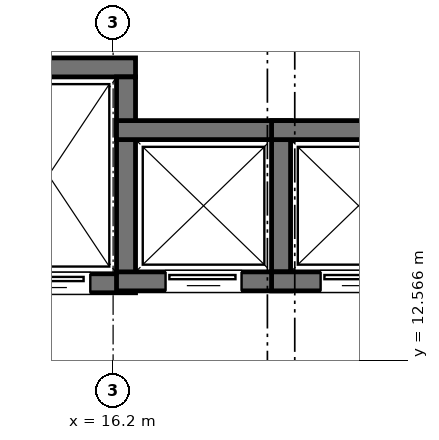
"""IFC4 building model, lengths in metres.
Left out: names, types, materials, properties, quantities, classifications, styles, units other than length and angle.
Written with IfcOpenShell. Run it as: python <this file> out.ifc"""

import sys

from ifc_helpers import new_model, si_unit, direction, frame, frame_2d, origin, place, context, subcontext, project, spatial, rectangle, extrude, element, fill, save


model = new_model("IFC4")
c1 = context("Model", 3, precision=1e-05, world=origin(), true_north=direction((0.0, 1.0)))
c2 = subcontext(c1, "Body", "Model", "MODEL_VIEW")
j1 = project(units=[si_unit("LENGTHUNIT", "METRE"), si_unit("PLANEANGLEUNIT", "RADIAN")], contexts=[c1])
p1 = place(None, origin())
s1 = spatial("IfcSite", under=j1, at=p1, CompositionType="ELEMENT")
p2 = place(p1, origin())
s2 = spatial("IfcBuilding", under=s1, at=p2, CompositionType="ELEMENT")
p3 = place(p2, frame((0.0, 0.0, 10.2)))
s3 = spatial("IfcBuildingStorey", under=s2, at=p3, CompositionType="ELEMENT", Elevation=10.2)
p4 = place(p3, frame((14.205, 13.58, 0.0), z_axis=(0.0, 0.0, 1.0), x_axis=(1.0, 0.0, 0.0)))
e1 = element("IfcWall", 1, at=p4, inside=s3, PredefinedType="SHEAR", context=c2, shape_type="SweptSolid", body=[
    extrude(rectangle(XDim=2.29, YDim=0.25, at=frame_2d((1.145, 0.0))), origin(), (0.0, 0.0, 1.0), 4.56),
])
p5 = place(p4, frame((0.595, 0.0, 0.0)))
e2 = element("IfcOpeningElement", 2, at=p5, cuts=e1, PredefinedType="OPENING", context=c2, shape_type="SweptSolid", body=[
    extrude(rectangle(XDim=1.1, YDim=2.2, at=frame_2d((0.55, 1.1))), frame((0.0, 0.135, 0.0), z_axis=(0.0, -1.0, 0.0), x_axis=(1.0, 0.0, 0.0)), (0.0, 0.0, 1.0), 0.27),
])
p6 = place(p3, frame((14.205, 16.42, 0.0), z_axis=(0.0, 0.0, 1.0), x_axis=(1.0, 0.0, 0.0)))
e3 = element("IfcWall", 3, at=p6, inside=s3, PredefinedType="SHEAR", context=c2, shape_type="SweptSolid", body=[
    extrude(rectangle(XDim=2.29, YDim=0.25, at=frame_2d((1.145, 0.0))), origin(), (0.0, 0.0, 1.0), 4.56),
])
p7 = place(p3, frame((16.37, 13.705, 0.0), z_axis=(0.0, 0.0, 1.0), x_axis=(0.0, 1.0, 0.0)))
e4 = element("IfcWall", 4, at=p7, inside=s3, PredefinedType="SHEAR", context=c2, shape_type="SweptSolid", body=[
    extrude(rectangle(XDim=2.59, YDim=0.25, at=frame_2d((1.295, 0.0))), origin(), (0.0, 0.0, 1.0), 4.56),
])
p8 = place(p3, frame((16.245, 13.605, 0.0), z_axis=(0.0, 0.0, 1.0), x_axis=(1.0, 0.0, 0.0)))
e5 = element("IfcWall", 5, at=p8, inside=s3, PredefinedType="SHEAR", context=c2, shape_type="SweptSolid", body=[
    extrude(rectangle(XDim=2.29, YDim=0.25, at=frame_2d((1.145, 0.0))), origin(), (0.0, 0.0, 1.0), 4.56),
])
p9 = place(p8, frame((0.645, 0.0, 0.0)))
e6 = element("IfcOpeningElement", 6, at=p9, cuts=e5, PredefinedType="OPENING", context=c2, shape_type="SweptSolid", body=[
    extrude(rectangle(XDim=1.0, YDim=2.15, at=frame_2d((0.5, 1.075))), frame((0.0, 0.135, 0.0), z_axis=(0.0, -1.0, 0.0), x_axis=(1.0, 0.0, 0.0)), (0.0, 0.0, 1.0), 0.27),
])
p10 = place(p3, frame((16.245, 15.595, 0.0), z_axis=(0.0, 0.0, 1.0), x_axis=(1.0, 0.0, 0.0)))
e7 = element("IfcWall", 7, at=p10, inside=s3, PredefinedType="SHEAR", context=c2, shape_type="SweptSolid", body=[
    extrude(rectangle(XDim=2.29, YDim=0.25, at=frame_2d((1.145, 0.0))), origin(), (0.0, 0.0, 1.0), 4.56),
])
p11 = place(p3, frame((18.41, 13.73, 0.0), z_axis=(0.0, 0.0, 1.0), x_axis=(0.0, 1.0, 0.0)))
e8 = element("IfcWall", 8, at=p11, inside=s3, PredefinedType="SHEAR", context=c2, shape_type="SweptSolid", body=[
    extrude(rectangle(XDim=1.74, YDim=0.25, at=frame_2d((0.87, 0.0))), origin(), (0.0, 0.0, 1.0), 4.56),
])
p12 = place(p3, frame((18.285, 13.605, 0.0), z_axis=(0.0, 0.0, 1.0), x_axis=(1.0, 0.0, 0.0)))
e9 = element("IfcWall", 9, at=p12, inside=s3, PredefinedType="SHEAR", context=c2, shape_type="SweptSolid", body=[
    extrude(rectangle(XDim=2.29, YDim=0.25, at=frame_2d((1.145, 0.0))), origin(), (0.0, 0.0, 1.0), 4.56),
])
p13 = place(p12, frame((0.645, 0.0, 0.0)))
e10 = element("IfcOpeningElement", 10, at=p13, cuts=e9, PredefinedType="OPENING", context=c2, shape_type="SweptSolid", body=[
    extrude(rectangle(XDim=1.0, YDim=2.15, at=frame_2d((0.5, 1.075))), frame((0.0, 0.135, 0.0), z_axis=(0.0, -1.0, 0.0), x_axis=(1.0, 0.0, 0.0)), (0.0, 0.0, 1.0), 0.27),
])
p14 = place(p3, frame((18.285, 15.595, 0.0), z_axis=(0.0, 0.0, 1.0), x_axis=(1.0, 0.0, 0.0)))
e11 = element("IfcWall", 11, at=p14, inside=s3, PredefinedType="SHEAR", context=c2, shape_type="SweptSolid", body=[
    extrude(rectangle(XDim=2.29, YDim=0.25, at=frame_2d((1.145, 0.0))), origin(), (0.0, 0.0, 1.0), 4.56),
])
p15 = place(p5, frame((1.1, 0.0, 0.0), z_axis=(0.0, 0.0, 1.0), x_axis=(-1.0, 0.0, 0.0)))
e12 = element("IfcDoor", 12, at=p15, inside=s3, OperationType="SLIDING_TO_LEFT", PredefinedType="DOOR", context=c2, shape_type="SweptSolid", body=[
    extrude(rectangle(XDim=1.1, YDim=2.2, at=frame_2d((0.55, 1.1))), frame((0.0, 0.025, 0.0), z_axis=(0.0, -1.0, 0.0), x_axis=(1.0, 0.0, 0.0)), (0.0, 0.0, 1.0), 0.05),
])
fill(e2, e12)
p16 = place(p9, frame((1.0, 0.0, 0.0), z_axis=(0.0, 0.0, 1.0), x_axis=(-1.0, 0.0, 0.0)))
e13 = element("IfcDoor", 13, at=p16, inside=s3, OperationType="SLIDING_TO_LEFT", PredefinedType="DOOR", context=c2, shape_type="SweptSolid", body=[
    extrude(rectangle(XDim=1.0, YDim=2.15, at=frame_2d((0.5, 1.075))), frame((0.0, 0.025, 0.0), z_axis=(0.0, -1.0, 0.0), x_axis=(1.0, 0.0, 0.0)), (0.0, 0.0, 1.0), 0.05),
])
fill(e6, e13)
p17 = place(p13, frame((1.0, 0.0, 0.0), z_axis=(0.0, 0.0, 1.0), x_axis=(-1.0, 0.0, 0.0)))
e14 = element("IfcDoor", 14, at=p17, inside=s3, OperationType="SLIDING_TO_LEFT", PredefinedType="DOOR", context=c2, shape_type="SweptSolid", body=[
    extrude(rectangle(XDim=1.0, YDim=2.15, at=frame_2d((0.5, 1.075))), frame((0.0, 0.025, 0.0), z_axis=(0.0, -1.0, 0.0), x_axis=(1.0, 0.0, 0.0)), (0.0, 0.0, 1.0), 0.05),
])
fill(e10, e14)
save(model, sys.argv[1])
